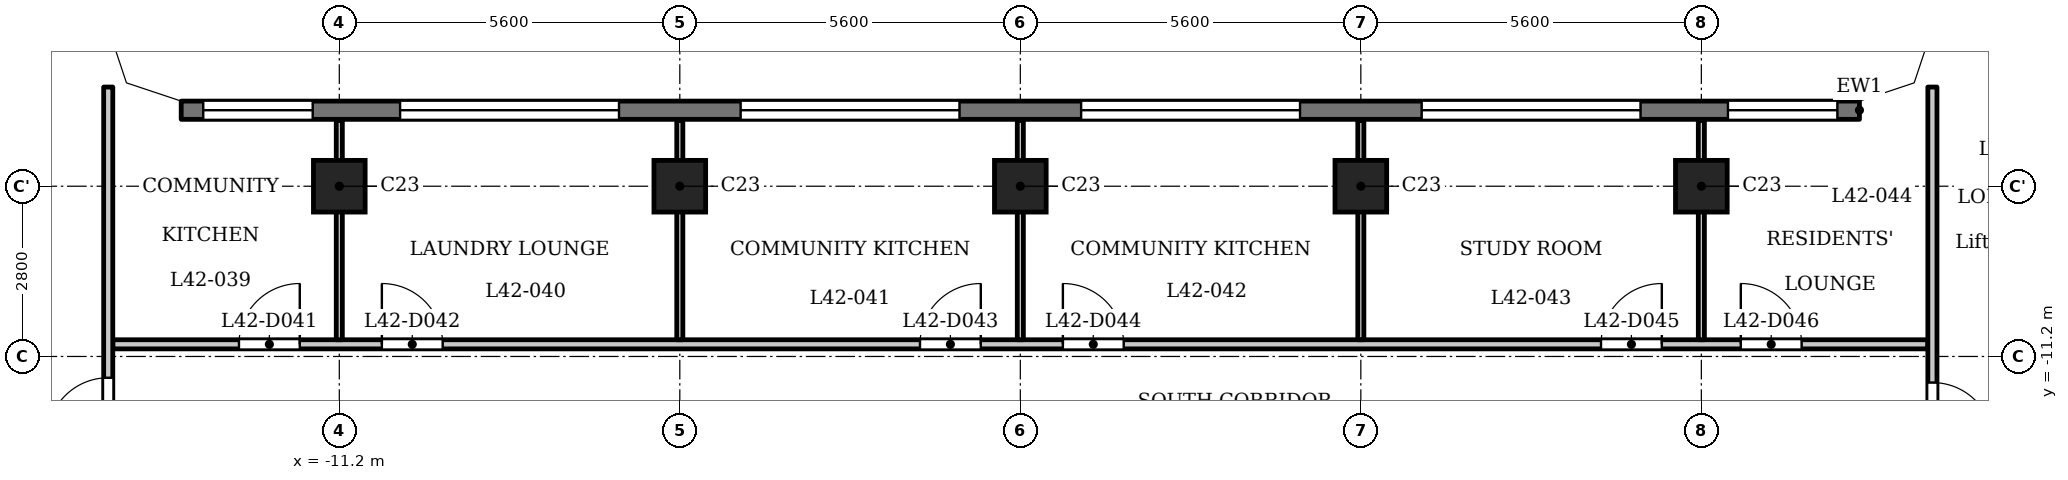
"""IFC4 building model, lengths in metres.
Left out: names, types, materials, properties, quantities, classifications, styles, units other than length and angle.
Written with IfcOpenShell. Run it as: python <this file> out.ifc"""

import sys

from ifc_helpers import new_model, si_unit, direction, frame, frame_2d, origin, origin_2d, place, context, subcontext, project, spatial, polyline, rectangle, outline, extrude, element, fill, save


model = new_model("IFC4")
c1 = context("Model", 3, precision=1e-05, world=origin(), true_north=direction((0.0, 1.0)))
c2 = subcontext(c1, "Body", "Model", "MODEL_VIEW")
j1 = project(units=[si_unit("LENGTHUNIT", "METRE"), si_unit("PLANEANGLEUNIT", "RADIAN")], contexts=[c1])
p1 = place(None, origin())
s1 = spatial("IfcSite", under=j1, at=p1, CompositionType="ELEMENT")
p2 = place(p1, origin())
s2 = spatial("IfcBuilding", under=s1, at=p2, CompositionType="ELEMENT")
p3 = place(p2, frame((0.0, 0.0, 164.1)))
s3 = spatial("IfcBuildingStorey", under=s2, at=p3, CompositionType="ELEMENT", Elevation=164.1)
for number, where, z_axis, x_axis in (
    (1, (-11.2, -8.4, 0.0), (0.0, 0.0, 1.0), (1.0, 0.0, 0.0)),
    (2, (-5.6, -8.4, 0.0), (0.0, 0.0, 1.0), (1.0, 0.0, 0.0)),
    (3, (0.0, -8.4, 0.0), (0.0, 0.0, 1.0), (1.0, 0.0, 0.0)),
    (4, (5.6, -8.4, 0.0), (0.0, 0.0, 1.0), (1.0, 0.0, 0.0)),
    (5, (11.2, -8.4, 0.0), (0.0, 0.0, 1.0), (1.0, 0.0, 0.0)),
):
    element("IfcColumn", number, at=place(p3, frame(where, z_axis=z_axis, x_axis=x_axis)), inside=s3, PredefinedType="COLUMN", context=c2, shape_type="SweptSolid", body=[
        extrude(rectangle(XDim=0.85, YDim=0.85, at=origin_2d()), origin(), (0.0, 0.0, 1.0), 3.5),
    ])
p4 = place(p3, frame((13.8, -7.15, 0.0), z_axis=(0.0, 0.0, 1.0), x_axis=(-1.0, 0.0, 0.0)))
e6 = element("IfcWall", 6, at=p4, inside=s3, PredefinedType="SOLIDWALL", context=c2, shape_type="SweptSolid", body=[
    extrude(rectangle(XDim=27.6, YDim=0.3, at=frame_2d((13.8, 0.0))), origin(), (0.0, 0.0, 1.0), 3.2),
])
p5 = place(p4, frame((0.363, 0.0, 0.9)))
e7 = element("IfcOpeningElement", 7, at=p5, cuts=e6, PredefinedType="OPENING", context=c2, shape_type="SweptSolid", body=[
    extrude(rectangle(XDim=1.8, YDim=1.25, at=frame_2d((0.9, 0.625))), frame((0.0, 0.16, 0.0), z_axis=(0.0, -1.0, 0.0), x_axis=(1.0, 0.0, 0.0)), (0.0, 0.0, 1.0), 0.32),
])
p6 = place(p4, frame((3.6, 0.0, 1.2)))
e8 = element("IfcOpeningElement", 8, at=p6, cuts=e6, PredefinedType="OPENING", context=c2, shape_type="SweptSolid", body=[
    extrude(rectangle(XDim=3.6, YDim=0.95, at=frame_2d((1.8, 0.475))), frame((0.0, 0.16, 0.0), z_axis=(0.0, -1.0, 0.0), x_axis=(1.0, 0.0, 0.0)), (0.0, 0.0, 1.0), 0.32),
])
p7 = place(p4, frame((9.2, 0.0, 1.2)))
e9 = element("IfcOpeningElement", 9, at=p7, cuts=e6, PredefinedType="OPENING", context=c2, shape_type="SweptSolid", body=[
    extrude(rectangle(XDim=3.6, YDim=0.95, at=frame_2d((1.8, 0.475))), frame((0.0, 0.16, 0.0), z_axis=(0.0, -1.0, 0.0), x_axis=(1.0, 0.0, 0.0)), (0.0, 0.0, 1.0), 0.32),
])
p8 = place(p4, frame((14.8, 0.0, 1.2)))
e10 = element("IfcOpeningElement", 10, at=p8, cuts=e6, PredefinedType="OPENING", context=c2, shape_type="SweptSolid", body=[
    extrude(rectangle(XDim=3.6, YDim=0.95, at=frame_2d((1.8, 0.475))), frame((0.0, 0.16, 0.0), z_axis=(0.0, -1.0, 0.0), x_axis=(1.0, 0.0, 0.0)), (0.0, 0.0, 1.0), 0.32),
])
p9 = place(p4, frame((20.4, 0.0, 1.2)))
e11 = element("IfcOpeningElement", 11, at=p9, cuts=e6, PredefinedType="OPENING", context=c2, shape_type="SweptSolid", body=[
    extrude(rectangle(XDim=3.6, YDim=0.95, at=frame_2d((1.8, 0.475))), frame((0.0, 0.16, 0.0), z_axis=(0.0, -1.0, 0.0), x_axis=(1.0, 0.0, 0.0)), (0.0, 0.0, 1.0), 0.32),
])
p10 = place(p4, frame((25.438, 0.0, 0.9)))
e12 = element("IfcOpeningElement", 12, at=p10, cuts=e6, PredefinedType="OPENING", context=c2, shape_type="SweptSolid", body=[
    extrude(rectangle(XDim=1.8, YDim=1.25, at=frame_2d((0.9, 0.625))), frame((0.0, 0.16, 0.0), z_axis=(0.0, -1.0, 0.0), x_axis=(1.0, 0.0, 0.0)), (0.0, 0.0, 1.0), 0.32),
])
p11 = place(p3, frame((-14.925, -11.0, 0.0), z_axis=(0.0, 0.0, 1.0), x_axis=(1.0, 0.0, 0.0)))
e13 = element("IfcWall", 13, at=p11, inside=s3, PredefinedType="PARTITIONING", context=c2, shape_type="SweptSolid", body=[
    extrude(rectangle(XDim=29.85, YDim=0.15, at=frame_2d((14.925, 0.0))), origin(), (0.0, 0.0, 1.0), 3.2),
])
p12 = place(p11, frame((2.075, 0.0, 0.0)))
e14 = element("IfcOpeningElement", 14, at=p12, cuts=e13, PredefinedType="OPENING", context=c2, shape_type="SweptSolid", body=[
    extrude(rectangle(XDim=1.0, YDim=2.1, at=frame_2d((0.5, 1.05))), frame((0.0, 0.085, 0.0), z_axis=(0.0, -1.0, 0.0), x_axis=(1.0, 0.0, 0.0)), (0.0, 0.0, 1.0), 0.17),
])
p13 = place(p11, frame((4.425, 0.0, 0.0)))
e15 = element("IfcOpeningElement", 15, at=p13, cuts=e13, PredefinedType="OPENING", context=c2, shape_type="SweptSolid", body=[
    extrude(rectangle(XDim=1.0, YDim=2.1, at=frame_2d((0.5, 1.05))), frame((0.0, 0.085, 0.0), z_axis=(0.0, -1.0, 0.0), x_axis=(1.0, 0.0, 0.0)), (0.0, 0.0, 1.0), 0.17),
])
p14 = place(p11, frame((13.275, 0.0, 0.0)))
e16 = element("IfcOpeningElement", 16, at=p14, cuts=e13, PredefinedType="OPENING", context=c2, shape_type="SweptSolid", body=[
    extrude(rectangle(XDim=1.0, YDim=2.1, at=frame_2d((0.5, 1.05))), frame((0.0, 0.085, 0.0), z_axis=(0.0, -1.0, 0.0), x_axis=(1.0, 0.0, 0.0)), (0.0, 0.0, 1.0), 0.17),
])
p15 = place(p11, frame((15.625, 0.0, 0.0)))
e17 = element("IfcOpeningElement", 17, at=p15, cuts=e13, PredefinedType="OPENING", context=c2, shape_type="SweptSolid", body=[
    extrude(rectangle(XDim=1.0, YDim=2.1, at=frame_2d((0.5, 1.05))), frame((0.0, 0.085, 0.0), z_axis=(0.0, -1.0, 0.0), x_axis=(1.0, 0.0, 0.0)), (0.0, 0.0, 1.0), 0.17),
])
p16 = place(p11, frame((24.475, 0.0, 0.0)))
e18 = element("IfcOpeningElement", 18, at=p16, cuts=e13, PredefinedType="OPENING", context=c2, shape_type="SweptSolid", body=[
    extrude(rectangle(XDim=1.0, YDim=2.1, at=frame_2d((0.5, 1.05))), frame((0.0, 0.085, 0.0), z_axis=(0.0, -1.0, 0.0), x_axis=(1.0, 0.0, 0.0)), (0.0, 0.0, 1.0), 0.17),
])
p17 = place(p11, frame((26.774, 0.0, 0.0)))
e19 = element("IfcOpeningElement", 19, at=p17, cuts=e13, PredefinedType="OPENING", context=c2, shape_type="SweptSolid", body=[
    extrude(rectangle(XDim=1.0, YDim=2.1, at=frame_2d((0.5, 1.05))), frame((0.0, 0.085, 0.0), z_axis=(0.0, -1.0, 0.0), x_axis=(1.0, 0.0, 0.0)), (0.0, 0.0, 1.0), 0.17),
])
p18 = place(p3, frame((-15.0, -13.125, 0.0), z_axis=(0.0, 0.0, 1.0), x_axis=(0.0, 1.0, 0.0)))
e20 = element("IfcWall", 20, at=p18, inside=s3, PredefinedType="PARTITIONING", context=c2, shape_type="SweptSolid", body=[
    extrude(rectangle(XDim=6.356, YDim=0.15, at=frame_2d((3.178, 0.0))), origin(), (0.0, 0.0, 1.0), 3.2),
])
p19 = place(p18, frame((0.575, 0.0, 0.0)))
e21 = element("IfcOpeningElement", 21, at=p19, cuts=e20, PredefinedType="OPENING", context=c2, shape_type="SweptSolid", body=[
    extrude(rectangle(XDim=1.0, YDim=2.1, at=frame_2d((0.5, 1.05))), frame((0.0, 0.085, 0.0), z_axis=(0.0, -1.0, 0.0), x_axis=(1.0, 0.0, 0.0)), (0.0, 0.0, 1.0), 0.17),
])
for number, where, z_axis, x_axis in (
    (22, (-11.2, -10.925, 0.0), (0.0, 0.0, 1.0), (0.0, 1.0, 0.0)),
    (23, (-5.6, -10.925, 0.0), (0.0, 0.0, 1.0), (0.0, 1.0, 0.0)),
    (24, (0.0, -10.925, 0.0), (0.0, 0.0, 1.0), (0.0, 1.0, 0.0)),
    (25, (5.6, -10.925, 0.0), (0.0, 0.0, 1.0), (0.0, 1.0, 0.0)),
    (26, (11.2, -10.925, 0.0), (0.0, 0.0, 1.0), (0.0, 1.0, 0.0)),
):
    element("IfcWall", number, at=place(p3, frame(where, z_axis=z_axis, x_axis=x_axis)), inside=s3, PredefinedType="PARTITIONING", context=c2, shape_type="SweptSolid", body=[
        extrude(rectangle(XDim=3.605, YDim=0.1, at=frame_2d((1.802, 0.0))), origin(), (0.0, 0.0, 1.0), 3.2),
    ])
p20 = place(p3, frame((15.0, -13.125, 0.0), z_axis=(0.0, 0.0, 1.0), x_axis=(0.0, 1.0, 0.0)))
e27 = element("IfcWall", 27, at=p20, inside=s3, PredefinedType="PARTITIONING", context=c2, shape_type="SweptSolid", body=[
    extrude(rectangle(XDim=6.356, YDim=0.15, at=frame_2d((3.178, 0.0))), origin(), (0.0, 0.0, 1.0), 3.2),
])
p21 = place(p20, frame((0.496, 0.0, 0.0)))
e28 = element("IfcOpeningElement", 28, at=p21, cuts=e27, PredefinedType="OPENING", context=c2, shape_type="SweptSolid", body=[
    extrude(rectangle(XDim=1.0, YDim=2.1, at=frame_2d((0.5, 1.05))), frame((0.0, 0.085, 0.0), z_axis=(0.0, -1.0, 0.0), x_axis=(1.0, 0.0, 0.0)), (0.0, 0.0, 1.0), 0.17),
])
p22 = place(p3, origin())
e29 = element("IfcWall", 29, at=p22, inside=s3, PredefinedType="SOLIDWALL", context=c2, shape_type="SweptSolid", body=[
    extrude(outline(polyline([(14.937, -6.937), (15.3, -5.849), (15.3, -5.8), (15.0, -5.8), (14.7, -6.7), (13.8, -7.0), (13.8, -7.3), (13.849, -7.3), (14.937, -6.937)])), origin(), (0.0, 0.0, 1.0), 3.2),
])
e30 = element("IfcWall", 30, at=p22, inside=s3, PredefinedType="SOLIDWALL", context=c2, shape_type="SweptSolid", body=[
    extrude(outline(polyline([(-14.937, -6.937), (-13.849, -7.3), (-13.8, -7.3), (-13.8, -7.0), (-14.7, -6.7), (-15.0, -5.8), (-15.3, -5.8), (-15.3, -5.849), (-14.937, -6.937)])), origin(), (0.0, 0.0, 1.0), 3.2),
])
p23 = place(p19, origin())
e31 = element("IfcDoor", 31, at=p23, inside=s3, OperationType="SINGLE_SWING_RIGHT", PredefinedType="DOOR", context=c2, shape_type="SweptSolid", body=[
    extrude(rectangle(XDim=1.0, YDim=2.1, at=frame_2d((0.5, 1.05))), frame((0.0, 0.025, 0.0), z_axis=(0.0, -1.0, 0.0), x_axis=(1.0, 0.0, 0.0)), (0.0, 0.0, 1.0), 0.05),
])
fill(e21, e31)
p24 = place(p21, origin())
e32 = element("IfcDoor", 32, at=p24, inside=s3, OperationType="SINGLE_SWING_LEFT", PredefinedType="DOOR", context=c2, shape_type="SweptSolid", body=[
    extrude(rectangle(XDim=1.0, YDim=2.1, at=frame_2d((0.5, 1.05))), frame((0.0, 0.025, 0.0), z_axis=(0.0, -1.0, 0.0), x_axis=(1.0, 0.0, 0.0)), (0.0, 0.0, 1.0), 0.05),
])
fill(e28, e32)
p25 = place(p12, origin())
e33 = element("IfcDoor", 33, at=p25, inside=s3, OperationType="SINGLE_SWING_LEFT", PredefinedType="DOOR", context=c2, shape_type="SweptSolid", body=[
    extrude(rectangle(XDim=1.0, YDim=2.1, at=frame_2d((0.5, 1.05))), frame((0.0, 0.025, 0.0), z_axis=(0.0, -1.0, 0.0), x_axis=(1.0, 0.0, 0.0)), (0.0, 0.0, 1.0), 0.05),
])
fill(e14, e33)
p26 = place(p13, origin())
e34 = element("IfcDoor", 34, at=p26, inside=s3, OperationType="SINGLE_SWING_RIGHT", PredefinedType="DOOR", context=c2, shape_type="SweptSolid", body=[
    extrude(rectangle(XDim=1.0, YDim=2.1, at=frame_2d((0.5, 1.05))), frame((0.0, 0.025, 0.0), z_axis=(0.0, -1.0, 0.0), x_axis=(1.0, 0.0, 0.0)), (0.0, 0.0, 1.0), 0.05),
])
fill(e15, e34)
p27 = place(p14, origin())
e35 = element("IfcDoor", 35, at=p27, inside=s3, OperationType="SINGLE_SWING_LEFT", PredefinedType="DOOR", context=c2, shape_type="SweptSolid", body=[
    extrude(rectangle(XDim=1.0, YDim=2.1, at=frame_2d((0.5, 1.05))), frame((0.0, 0.025, 0.0), z_axis=(0.0, -1.0, 0.0), x_axis=(1.0, 0.0, 0.0)), (0.0, 0.0, 1.0), 0.05),
])
fill(e16, e35)
p28 = place(p15, origin())
e36 = element("IfcDoor", 36, at=p28, inside=s3, OperationType="SINGLE_SWING_RIGHT", PredefinedType="DOOR", context=c2, shape_type="SweptSolid", body=[
    extrude(rectangle(XDim=1.0, YDim=2.1, at=frame_2d((0.5, 1.05))), frame((0.0, 0.025, 0.0), z_axis=(0.0, -1.0, 0.0), x_axis=(1.0, 0.0, 0.0)), (0.0, 0.0, 1.0), 0.05),
])
fill(e17, e36)
p29 = place(p16, origin())
e37 = element("IfcDoor", 37, at=p29, inside=s3, OperationType="SINGLE_SWING_LEFT", PredefinedType="DOOR", context=c2, shape_type="SweptSolid", body=[
    extrude(rectangle(XDim=1.0, YDim=2.1, at=frame_2d((0.5, 1.05))), frame((0.0, 0.025, 0.0), z_axis=(0.0, -1.0, 0.0), x_axis=(1.0, 0.0, 0.0)), (0.0, 0.0, 1.0), 0.05),
])
fill(e18, e37)
p30 = place(p17, origin())
e38 = element("IfcDoor", 38, at=p30, inside=s3, OperationType="SINGLE_SWING_RIGHT", PredefinedType="DOOR", context=c2, shape_type="SweptSolid", body=[
    extrude(rectangle(XDim=1.0, YDim=2.1, at=frame_2d((0.5, 1.05))), frame((0.0, 0.025, 0.0), z_axis=(0.0, -1.0, 0.0), x_axis=(1.0, 0.0, 0.0)), (0.0, 0.0, 1.0), 0.05),
])
fill(e19, e38)
p31 = place(p5, origin())
e39 = element("IfcWindow", 39, at=p31, inside=s3, PartitioningType="SINGLE_PANEL", PredefinedType="WINDOW", context=c2, shape_type="SweptSolid", body=[
    extrude(rectangle(XDim=1.8, YDim=1.25, at=frame_2d((0.9, 0.625))), frame((0.0, 0.03, 0.0), z_axis=(0.0, -1.0, 0.0), x_axis=(1.0, 0.0, 0.0)), (0.0, 0.0, 1.0), 0.06),
])
fill(e7, e39)
p32 = place(p6, origin())
e40 = element("IfcWindow", 40, at=p32, inside=s3, PartitioningType="SINGLE_PANEL", PredefinedType="WINDOW", context=c2, shape_type="SweptSolid", body=[
    extrude(rectangle(XDim=3.6, YDim=0.95, at=frame_2d((1.8, 0.475))), frame((0.0, 0.03, 0.0), z_axis=(0.0, -1.0, 0.0), x_axis=(1.0, 0.0, 0.0)), (0.0, 0.0, 1.0), 0.06),
])
fill(e8, e40)
p33 = place(p7, origin())
e41 = element("IfcWindow", 41, at=p33, inside=s3, PartitioningType="SINGLE_PANEL", PredefinedType="WINDOW", context=c2, shape_type="SweptSolid", body=[
    extrude(rectangle(XDim=3.6, YDim=0.95, at=frame_2d((1.8, 0.475))), frame((0.0, 0.03, 0.0), z_axis=(0.0, -1.0, 0.0), x_axis=(1.0, 0.0, 0.0)), (0.0, 0.0, 1.0), 0.06),
])
fill(e9, e41)
p34 = place(p8, origin())
e42 = element("IfcWindow", 42, at=p34, inside=s3, PartitioningType="SINGLE_PANEL", PredefinedType="WINDOW", context=c2, shape_type="SweptSolid", body=[
    extrude(rectangle(XDim=3.6, YDim=0.95, at=frame_2d((1.8, 0.475))), frame((0.0, 0.03, 0.0), z_axis=(0.0, -1.0, 0.0), x_axis=(1.0, 0.0, 0.0)), (0.0, 0.0, 1.0), 0.06),
])
fill(e10, e42)
p35 = place(p9, origin())
e43 = element("IfcWindow", 43, at=p35, inside=s3, PartitioningType="SINGLE_PANEL", PredefinedType="WINDOW", context=c2, shape_type="SweptSolid", body=[
    extrude(rectangle(XDim=3.6, YDim=0.95, at=frame_2d((1.8, 0.475))), frame((0.0, 0.03, 0.0), z_axis=(0.0, -1.0, 0.0), x_axis=(1.0, 0.0, 0.0)), (0.0, 0.0, 1.0), 0.06),
])
fill(e11, e43)
p36 = place(p10, origin())
e44 = element("IfcWindow", 44, at=p36, inside=s3, PartitioningType="SINGLE_PANEL", PredefinedType="WINDOW", context=c2, shape_type="SweptSolid", body=[
    extrude(rectangle(XDim=1.8, YDim=1.25, at=frame_2d((0.9, 0.625))), frame((0.0, 0.03, 0.0), z_axis=(0.0, -1.0, 0.0), x_axis=(1.0, 0.0, 0.0)), (0.0, 0.0, 1.0), 0.06),
])
fill(e12, e44)
save(model, sys.argv[1])
